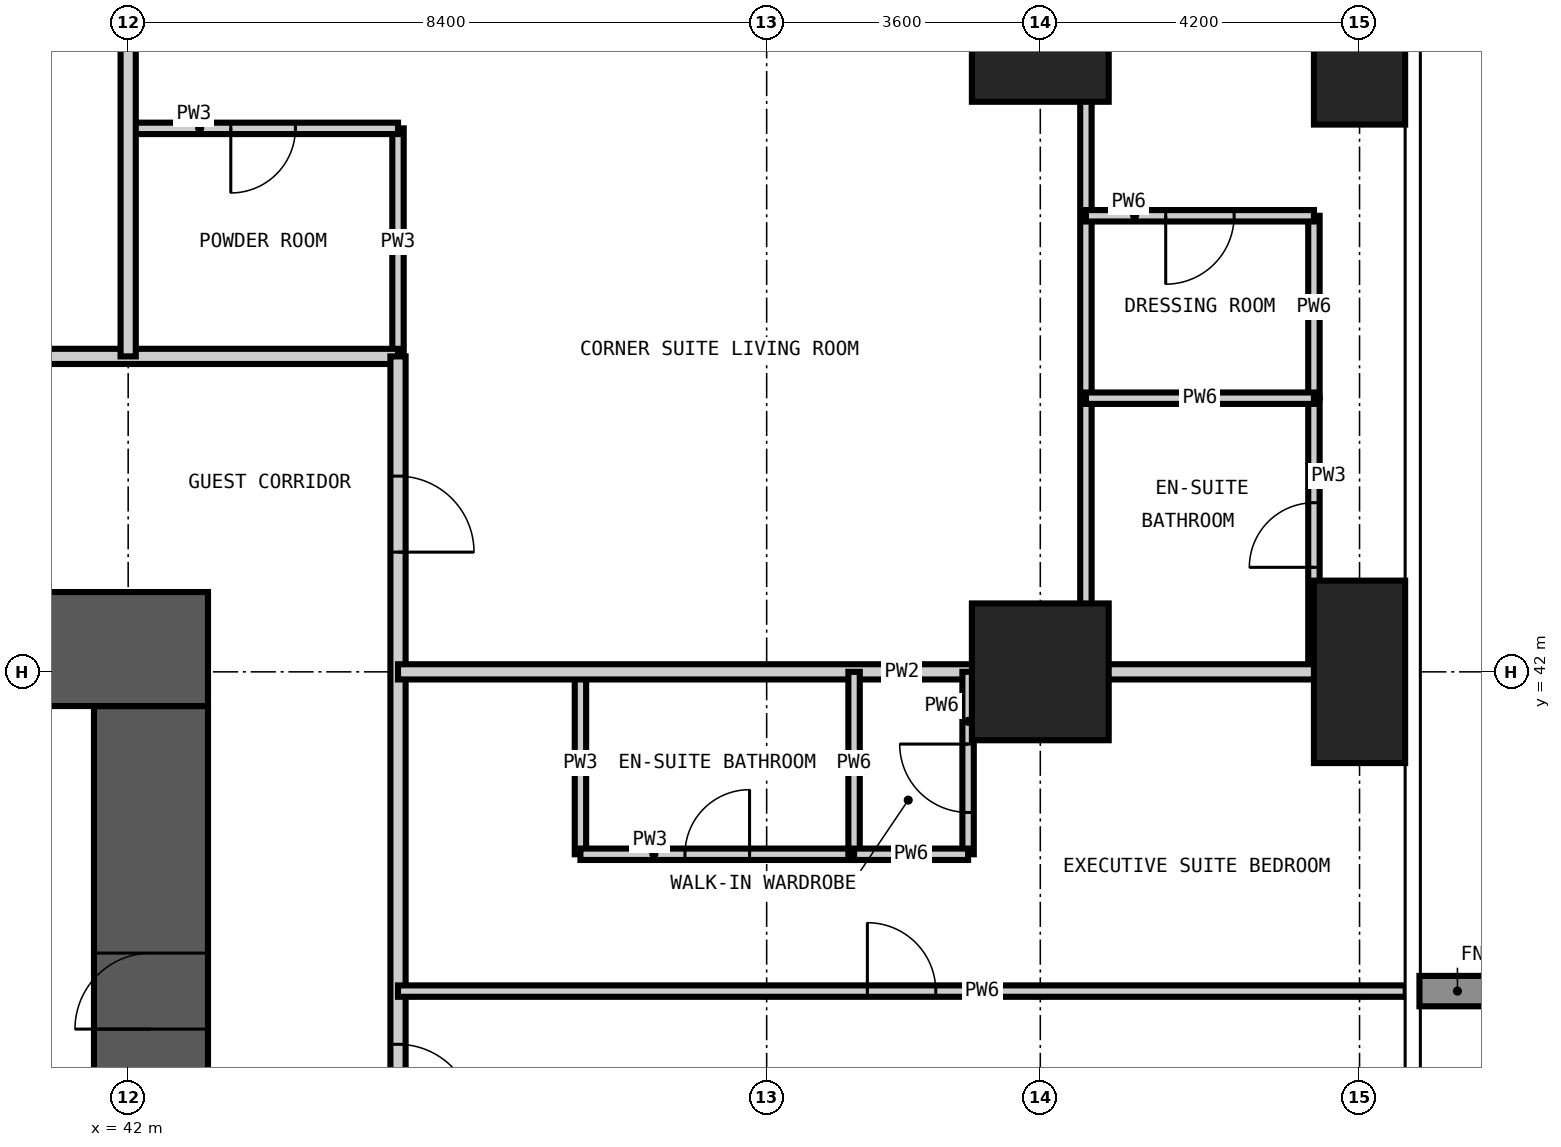
"""IFC4 building model, lengths in metres.
Left out: names, types, materials, properties, quantities, classifications, styles, units other than length and angle.
Written with IfcOpenShell. Run it as: python <this file> out.ifc"""

import sys

from ifc_helpers import new_model, si_unit, direction, frame, frame_2d, origin, origin_2d, place, context, subcontext, project, spatial, rectangle, extrude, element, fill, save


model = new_model("IFC4")
c1 = context("Model", 3, precision=1e-05, world=origin(), true_north=direction((0.0, 1.0)))
c2 = subcontext(c1, "Body", "Model", "MODEL_VIEW")
j1 = project(units=[si_unit("LENGTHUNIT", "METRE"), si_unit("PLANEANGLEUNIT", "RADIAN")], contexts=[c1])
p1 = place(None, origin())
s1 = spatial("IfcSite", under=j1, at=p1, CompositionType="ELEMENT")
p2 = place(p1, origin())
s2 = spatial("IfcBuilding", under=s1, at=p2, CompositionType="ELEMENT")
p3 = place(p2, frame((0.0, 0.0, 55.8)))
s3 = spatial("IfcBuildingStorey", under=s2, at=p3, CompositionType="ELEMENT", Elevation=55.8)
for number, where, z_axis, x_axis in (
    (1, (54.0, 42.0, -0.35), (0.0, 0.0, 1.0), (1.0, 0.0, 0.0)),
    (2, (54.0, 50.4, -0.35), (0.0, 0.0, 1.0), (1.0, 0.0, 0.0)),
):
    element("IfcColumn", number, at=place(p3, frame(where, z_axis=z_axis, x_axis=x_axis)), inside=s3, PredefinedType="COLUMN", context=c2, shape_type="SweptSolid", body=[
        extrude(rectangle(XDim=1.8, YDim=1.8, at=origin_2d()), origin(), (0.0, 0.0, 1.0), 3.6),
    ])
for number, where, z_axis, x_axis in (
    (3, (58.2, 42.0, -0.35), (0.0, 0.0, 1.0), (1.0, 0.0, 0.0)),
    (4, (58.2, 50.4, -0.35), (0.0, 0.0, 1.0), (1.0, 0.0, 0.0)),
):
    element("IfcColumn", number, at=place(p3, frame(where, z_axis=z_axis, x_axis=x_axis)), inside=s3, PredefinedType="COLUMN", context=c2, shape_type="SweptSolid", body=[
        extrude(rectangle(XDim=1.2, YDim=2.4, at=origin_2d()), origin(), (0.0, 0.0, 1.0), 3.6),
    ])
p4 = place(p3, frame((42.3, 17.25, -0.35), z_axis=(0.0, 0.0, 1.0), x_axis=(0.0, 1.0, 0.0)))
e5 = element("IfcWall", 5, at=p4, inside=s3, PredefinedType="SHEAR", context=c2, shape_type="SweptSolid", body=[
    extrude(rectangle(XDim=24.3, YDim=1.5, at=frame_2d((12.15, 0.0))), origin(), (0.0, 0.0, 1.0), 3.6),
])
p5 = place(p4, frame((0.35, 0.0, 0.35)))
e6 = element("IfcOpeningElement", 6, at=p5, cuts=e5, PredefinedType="OPENING", context=c2, shape_type="SweptSolid", body=[
    extrude(rectangle(XDim=1.2, YDim=2.2, at=frame_2d((0.6, 1.1))), frame((0.0, 0.76, 0.0), z_axis=(0.0, -1.0, 0.0), x_axis=(1.0, 0.0, 0.0)), (0.0, 0.0, 1.0), 1.52),
])
p6 = place(p4, frame((11.65, 0.0, 0.35)))
e7 = element("IfcOpeningElement", 7, at=p6, cuts=e5, PredefinedType="OPENING", context=c2, shape_type="SweptSolid", body=[
    extrude(rectangle(XDim=1.0, YDim=2.1, at=frame_2d((0.5, 1.05))), frame((0.0, 0.76, 0.0), z_axis=(0.0, -1.0, 0.0), x_axis=(1.0, 0.0, 0.0)), (0.0, 0.0, 1.0), 1.52),
])
p7 = place(p4, frame((20.05, 0.0, 0.35)))
e8 = element("IfcOpeningElement", 8, at=p7, cuts=e5, PredefinedType="OPENING", context=c2, shape_type="SweptSolid", body=[
    extrude(rectangle(XDim=1.0, YDim=2.1, at=frame_2d((0.5, 1.05))), frame((0.0, 0.76, 0.0), z_axis=(0.0, -1.0, 0.0), x_axis=(1.0, 0.0, 0.0)), (0.0, 0.0, 1.0), 1.52),
])
p8 = place(p3, frame((43.05, 42.3, -0.35), z_axis=(0.0, 0.0, 1.0), x_axis=(-1.0, 0.0, 0.0)))
e9 = element("IfcWall", 9, at=p8, inside=s3, PredefinedType="SHEAR", context=c2, shape_type="SweptSolid", body=[
    extrude(rectangle(XDim=27.3, YDim=1.5, at=frame_2d((13.65, 0.0))), origin(), (0.0, 0.0, 1.0), 3.6),
])
p9 = place(p8, frame((21.55, 0.0, 0.35)))
e10 = element("IfcOpeningElement", 10, at=p9, cuts=e9, PredefinedType="OPENING", context=c2, shape_type="SweptSolid", body=[
    extrude(rectangle(XDim=1.0, YDim=2.1, at=frame_2d((0.5, 1.05))), frame((0.0, 0.76, 0.0), z_axis=(0.0, -1.0, 0.0), x_axis=(1.0, 0.0, 0.0)), (0.0, 0.0, 1.0), 1.52),
])
p10 = place(p8, frame((10.95, 0.0, 0.35)))
e11 = element("IfcOpeningElement", 11, at=p10, cuts=e9, PredefinedType="OPENING", context=c2, shape_type="SweptSolid", body=[
    extrude(rectangle(XDim=1.2, YDim=2.2, at=frame_2d((0.6, 1.1))), frame((0.0, 0.76, 0.0), z_axis=(0.0, -1.0, 0.0), x_axis=(1.0, 0.0, 0.0)), (0.0, 0.0, 1.0), 1.52),
])
p11 = place(p3, frame((45.55, 46.15, 0.0), z_axis=(0.0, 0.0, 1.0), x_axis=(0.0, 1.0, 0.0)))
e12 = element("IfcWall", 12, at=p11, inside=s3, PredefinedType="PARTITIONING", context=c2, shape_type="SweptSolid", body=[
    extrude(rectangle(XDim=3.0, YDim=0.15, at=frame_2d((1.5, 0.0))), origin(), (0.0, 0.0, 1.0), 3.25),
])
p12 = place(p3, frame((47.95, 39.6, 0.0), z_axis=(0.0, 0.0, 1.0), x_axis=(0.0, 1.0, 0.0)))
e13 = element("IfcWall", 13, at=p12, inside=s3, PredefinedType="PARTITIONING", context=c2, shape_type="SweptSolid", body=[
    extrude(rectangle(XDim=2.4, YDim=0.15, at=frame_2d((1.2, 0.0))), origin(), (0.0, 0.0, 1.0), 3.25),
])
p13 = place(p3, frame((57.6, 42.0, 0.0), z_axis=(0.0, 0.0, 1.0), x_axis=(0.0, 1.0, 0.0)))
e14 = element("IfcWall", 14, at=p13, inside=s3, PredefinedType="PARTITIONING", context=c2, shape_type="SweptSolid", body=[
    extrude(rectangle(XDim=3.6, YDim=0.15, at=frame_2d((1.8, 0.0))), origin(), (0.0, 0.0, 1.0), 3.25),
])
p14 = place(p13, frame((1.375, 0.0, 0.0)))
e15 = element("IfcOpeningElement", 15, at=p14, cuts=e14, PredefinedType="OPENING", context=c2, shape_type="SweptSolid", body=[
    extrude(rectangle(XDim=0.85, YDim=2.1, at=frame_2d((0.425, 1.05))), frame((0.0, 0.085, 0.0), z_axis=(0.0, -1.0, 0.0), x_axis=(1.0, 0.0, 0.0)), (0.0, 0.0, 1.0), 0.17),
])
p15 = place(p3, frame((47.95, 39.6, 0.0), z_axis=(0.0, 0.0, 1.0), x_axis=(1.0, 0.0, 0.0)))
e16 = element("IfcWall", 16, at=p15, inside=s3, PredefinedType="PARTITIONING", context=c2, shape_type="SweptSolid", body=[
    extrude(rectangle(XDim=3.6, YDim=0.15, at=frame_2d((1.8, 0.0))), origin(), (0.0, 0.0, 1.0), 3.25),
])
p16 = place(p15, frame((1.375, 0.0, 0.0)))
e17 = element("IfcOpeningElement", 17, at=p16, cuts=e16, PredefinedType="OPENING", context=c2, shape_type="SweptSolid", body=[
    extrude(rectangle(XDim=0.85, YDim=2.1, at=frame_2d((0.425, 1.05))), frame((0.0, 0.085, 0.0), z_axis=(0.0, -1.0, 0.0), x_axis=(1.0, 0.0, 0.0)), (0.0, 0.0, 1.0), 0.17),
])
p17 = place(p3, frame((42.0, 49.15, 0.0), z_axis=(0.0, 0.0, 1.0), x_axis=(1.0, 0.0, 0.0)))
e18 = element("IfcWall", 18, at=p17, inside=s3, PredefinedType="PARTITIONING", context=c2, shape_type="SweptSolid", body=[
    extrude(rectangle(XDim=3.55, YDim=0.15, at=frame_2d((1.775, 0.0))), origin(), (0.0, 0.0, 1.0), 3.25),
])
p18 = place(p17, frame((1.35, 0.0, 0.0)))
e19 = element("IfcOpeningElement", 19, at=p18, cuts=e18, PredefinedType="OPENING", context=c2, shape_type="SweptSolid", body=[
    extrude(rectangle(XDim=0.85, YDim=2.1, at=frame_2d((0.425, 1.05))), frame((0.0, 0.085, 0.0), z_axis=(0.0, -1.0, 0.0), x_axis=(1.0, 0.0, 0.0)), (0.0, 0.0, 1.0), 0.17),
])
p19 = place(p3, frame((13.85, 46.15, 0.0), z_axis=(0.0, 0.0, 1.0), x_axis=(1.0, 0.0, 0.0)))
e20 = element("IfcWall", 20, at=p19, inside=s3, PredefinedType="PARTITIONING", context=c2, shape_type="SweptSolid", body=[
    extrude(rectangle(XDim=31.7, YDim=0.2, at=frame_2d((15.85, 0.0))), origin(), (0.0, 0.0, 1.0), 3.25),
])
p20 = place(p19, frame((6.65, 0.0, 0.0)))
e21 = element("IfcOpeningElement", 21, at=p20, cuts=e20, PredefinedType="OPENING", context=c2, shape_type="SweptSolid", body=[
    extrude(rectangle(XDim=1.0, YDim=2.2, at=frame_2d((0.5, 1.1))), frame((0.0, 0.11, 0.0), z_axis=(0.0, -1.0, 0.0), x_axis=(1.0, 0.0, 0.0)), (0.0, 0.0, 1.0), 0.22),
])
p21 = place(p19, frame((15.05, 0.0, 0.0)))
e22 = element("IfcOpeningElement", 22, at=p21, cuts=e20, PredefinedType="OPENING", context=c2, shape_type="SweptSolid", body=[
    extrude(rectangle(XDim=1.0, YDim=2.2, at=frame_2d((0.5, 1.1))), frame((0.0, 0.11, 0.0), z_axis=(0.0, -1.0, 0.0), x_axis=(1.0, 0.0, 0.0)), (0.0, 0.0, 1.0), 0.22),
])
p22 = place(p19, frame((23.45, 0.0, 0.0)))
e23 = element("IfcOpeningElement", 23, at=p22, cuts=e20, PredefinedType="OPENING", context=c2, shape_type="SweptSolid", body=[
    extrude(rectangle(XDim=1.0, YDim=2.2, at=frame_2d((0.5, 1.1))), frame((0.0, 0.11, 0.0), z_axis=(0.0, -1.0, 0.0), x_axis=(1.0, 0.0, 0.0)), (0.0, 0.0, 1.0), 0.22),
])
p23 = place(p3, frame((45.55, 46.15, 0.0), z_axis=(0.0, 0.0, 1.0), x_axis=(0.0, -1.0, 0.0)))
e24 = element("IfcWall", 24, at=p23, inside=s3, PredefinedType="PARTITIONING", context=c2, shape_type="SweptSolid", body=[
    extrude(rectangle(XDim=32.3, YDim=0.2, at=frame_2d((16.15, 0.0))), origin(), (0.0, 0.0, 1.0), 3.25),
])
p24 = place(p23, frame((25.85, 0.0, 0.0)))
e25 = element("IfcOpeningElement", 25, at=p24, cuts=e24, PredefinedType="OPENING", context=c2, shape_type="SweptSolid", body=[
    extrude(rectangle(XDim=1.0, YDim=2.2, at=frame_2d((0.5, 1.1))), frame((0.0, 0.11, 0.0), z_axis=(0.0, -1.0, 0.0), x_axis=(1.0, 0.0, 0.0)), (0.0, 0.0, 1.0), 0.22),
])
p25 = place(p23, frame((17.45, 0.0, 0.0)))
e26 = element("IfcOpeningElement", 26, at=p25, cuts=e24, PredefinedType="OPENING", context=c2, shape_type="SweptSolid", body=[
    extrude(rectangle(XDim=1.0, YDim=2.2, at=frame_2d((0.5, 1.1))), frame((0.0, 0.11, 0.0), z_axis=(0.0, -1.0, 0.0), x_axis=(1.0, 0.0, 0.0)), (0.0, 0.0, 1.0), 0.22),
])
p26 = place(p23, frame((9.05, 0.0, 0.0)))
e27 = element("IfcOpeningElement", 27, at=p26, cuts=e24, PredefinedType="OPENING", context=c2, shape_type="SweptSolid", body=[
    extrude(rectangle(XDim=1.0, YDim=2.2, at=frame_2d((0.5, 1.1))), frame((0.0, 0.11, 0.0), z_axis=(0.0, -1.0, 0.0), x_axis=(1.0, 0.0, 0.0)), (0.0, 0.0, 1.0), 0.22),
])
p27 = place(p23, frame((30.325, 0.0, 0.0)))
e28 = element("IfcOpeningElement", 28, at=p27, cuts=e24, PredefinedType="OPENING", context=c2, shape_type="SweptSolid", body=[
    extrude(rectangle(XDim=1.0, YDim=2.2, at=frame_2d((0.5, 1.1))), frame((0.0, 0.11, 0.0), z_axis=(0.0, -1.0, 0.0), x_axis=(1.0, 0.0, 0.0)), (0.0, 0.0, 1.0), 0.22),
])
p28 = place(p23, frame((1.575, 0.0, 0.0)))
e29 = element("IfcOpeningElement", 29, at=p28, cuts=e24, PredefinedType="OPENING", context=c2, shape_type="SweptSolid", body=[
    extrude(rectangle(XDim=1.0, YDim=2.2, at=frame_2d((0.5, 1.1))), frame((0.0, 0.11, 0.0), z_axis=(0.0, -1.0, 0.0), x_axis=(1.0, 0.0, 0.0)), (0.0, 0.0, 1.0), 0.22),
])
p29 = place(p3, frame((42.0, 46.15, 0.0), z_axis=(0.0, 0.0, 1.0), x_axis=(0.0, 1.0, 0.0)))
e30 = element("IfcWall", 30, at=p29, inside=s3, PredefinedType="PARTITIONING", context=c2, shape_type="SweptSolid", body=[
    extrude(rectangle(XDim=12.658, YDim=0.2, at=frame_2d((6.329, 0.0))), origin(), (0.0, 0.0, 1.0), 3.25),
])
p30 = place(p3, frame((45.55, 42.0, 0.0), z_axis=(0.0, 0.0, 1.0), x_axis=(1.0, 0.0, 0.0)))
e31 = element("IfcWall", 31, at=p30, inside=s3, PredefinedType="PARTITIONING", context=c2, shape_type="SweptSolid", body=[
    extrude(rectangle(XDim=13.258, YDim=0.2, at=frame_2d((6.629, 0.0))), origin(), (0.0, 0.0, 1.0), 3.25),
])
p31 = place(p3, frame((51.55, 39.6, 0.0), z_axis=(0.0, 0.0, 1.0), x_axis=(0.0, 1.0, 0.0)))
e32 = element("IfcWall", 32, at=p31, inside=s3, PredefinedType="PARTITIONING", context=c2, shape_type="SweptSolid", body=[
    extrude(rectangle(XDim=2.4, YDim=0.15, at=frame_2d((1.2, 0.0))), origin(), (0.0, 0.0, 1.0), 3.25),
])
p32 = place(p3, frame((53.05, 39.6, 0.0), z_axis=(0.0, 0.0, 1.0), x_axis=(0.0, 1.0, 0.0)))
e33 = element("IfcWall", 33, at=p32, inside=s3, PredefinedType="PARTITIONING", context=c2, shape_type="SweptSolid", body=[
    extrude(rectangle(XDim=2.4, YDim=0.15, at=frame_2d((1.2, 0.0))), origin(), (0.0, 0.0, 1.0), 3.25),
])
p33 = place(p32, frame((0.55, 0.0, 0.0)))
e34 = element("IfcOpeningElement", 34, at=p33, cuts=e33, PredefinedType="OPENING", context=c2, shape_type="SweptSolid", body=[
    extrude(rectangle(XDim=0.9, YDim=2.1, at=frame_2d((0.45, 1.05))), frame((0.0, 0.085, 0.0), z_axis=(0.0, -1.0, 0.0), x_axis=(1.0, 0.0, 0.0)), (0.0, 0.0, 1.0), 0.17),
])
p34 = place(p3, frame((54.6, 42.0, 0.0), z_axis=(0.0, 0.0, 1.0), x_axis=(0.0, 1.0, 0.0)))
e35 = element("IfcWall", 35, at=p34, inside=s3, PredefinedType="PARTITIONING", context=c2, shape_type="SweptSolid", body=[
    extrude(rectangle(XDim=16.808, YDim=0.15, at=frame_2d((8.404, 0.0))), origin(), (0.0, 0.0, 1.0), 3.25),
])
p35 = place(p34, frame((10.95, 0.0, 0.0)))
e36 = element("IfcOpeningElement", 36, at=p35, cuts=e35, PredefinedType="OPENING", context=c2, shape_type="SweptSolid", body=[
    extrude(rectangle(XDim=0.9, YDim=2.1, at=frame_2d((0.45, 1.05))), frame((0.0, 0.085, 0.0), z_axis=(0.0, -1.0, 0.0), x_axis=(1.0, 0.0, 0.0)), (0.0, 0.0, 1.0), 0.17),
])
p36 = place(p3, frame((57.6, 45.6, 0.0), z_axis=(0.0, 0.0, 1.0), x_axis=(0.0, 1.0, 0.0)))
e37 = element("IfcWall", 37, at=p36, inside=s3, PredefinedType="PARTITIONING", context=c2, shape_type="SweptSolid", body=[
    extrude(rectangle(XDim=2.4, YDim=0.15, at=frame_2d((1.2, 0.0))), origin(), (0.0, 0.0, 1.0), 3.25),
])
p37 = place(p3, frame((45.55, 37.8, 0.0), z_axis=(0.0, 0.0, 1.0), x_axis=(1.0, 0.0, 0.0)))
e38 = element("IfcWall", 38, at=p37, inside=s3, PredefinedType="PARTITIONING", context=c2, shape_type="SweptSolid", body=[
    extrude(rectangle(XDim=13.258, YDim=0.15, at=frame_2d((6.629, 0.0))), origin(), (0.0, 0.0, 1.0), 3.25),
])
p38 = place(p37, frame((6.175, 0.0, 0.0)))
e39 = element("IfcOpeningElement", 39, at=p38, cuts=e38, PredefinedType="OPENING", context=c2, shape_type="SweptSolid", body=[
    extrude(rectangle(XDim=0.9, YDim=2.1, at=frame_2d((0.45, 1.05))), frame((0.0, 0.085, 0.0), z_axis=(0.0, -1.0, 0.0), x_axis=(1.0, 0.0, 0.0)), (0.0, 0.0, 1.0), 0.17),
])
p39 = place(p3, frame((51.55, 39.6, 0.0), z_axis=(0.0, 0.0, 1.0), x_axis=(1.0, 0.0, 0.0)))
e40 = element("IfcWall", 40, at=p39, inside=s3, PredefinedType="PARTITIONING", context=c2, shape_type="SweptSolid", body=[
    extrude(rectangle(XDim=1.5, YDim=0.15, at=frame_2d((0.75, 0.0))), origin(), (0.0, 0.0, 1.0), 3.25),
])
p40 = place(p3, frame((54.6, 45.6, 0.0), z_axis=(0.0, 0.0, 1.0), x_axis=(1.0, 0.0, 0.0)))
e41 = element("IfcWall", 41, at=p40, inside=s3, PredefinedType="PARTITIONING", context=c2, shape_type="SweptSolid", body=[
    extrude(rectangle(XDim=3.0, YDim=0.15, at=frame_2d((1.5, 0.0))), origin(), (0.0, 0.0, 1.0), 3.25),
])
p41 = place(p3, frame((54.6, 48.0, 0.0), z_axis=(0.0, 0.0, 1.0), x_axis=(1.0, 0.0, 0.0)))
e42 = element("IfcWall", 42, at=p41, inside=s3, PredefinedType="PARTITIONING", context=c2, shape_type="SweptSolid", body=[
    extrude(rectangle(XDim=3.0, YDim=0.15, at=frame_2d((1.5, 0.0))), origin(), (0.0, 0.0, 1.0), 3.25),
])
p42 = place(p41, frame((1.05, 0.0, 0.0)))
e43 = element("IfcOpeningElement", 43, at=p42, cuts=e42, PredefinedType="OPENING", context=c2, shape_type="SweptSolid", body=[
    extrude(rectangle(XDim=0.9, YDim=2.1, at=frame_2d((0.45, 1.05))), frame((0.0, 0.085, 0.0), z_axis=(0.0, -1.0, 0.0), x_axis=(1.0, 0.0, 0.0)), (0.0, 0.0, 1.0), 0.17),
])
p43 = place(p26, origin())
e44 = element("IfcDoor", 44, at=p43, inside=s3, OperationType="SINGLE_SWING_RIGHT", PredefinedType="DOOR", context=c2, shape_type="SweptSolid", body=[
    extrude(rectangle(XDim=1.0, YDim=2.2, at=frame_2d((0.5, 1.1))), frame((0.0, 0.025, 0.0), z_axis=(0.0, -1.0, 0.0), x_axis=(1.0, 0.0, 0.0)), (0.0, 0.0, 1.0), 0.05),
])
fill(e27, e44)
p44 = place(p38, origin())
e45 = element("IfcDoor", 45, at=p44, inside=s3, OperationType="SINGLE_SWING_LEFT", PredefinedType="DOOR", context=c2, shape_type="SweptSolid", body=[
    extrude(rectangle(XDim=0.9, YDim=2.1, at=frame_2d((0.45, 1.05))), frame((0.0, 0.025, 0.0), z_axis=(0.0, -1.0, 0.0), x_axis=(1.0, 0.0, 0.0)), (0.0, 0.0, 1.0), 0.05),
])
fill(e39, e45)
p45 = place(p16, origin())
e46 = element("IfcDoor", 46, at=p45, inside=s3, OperationType="SINGLE_SWING_RIGHT", PredefinedType="DOOR", context=c2, shape_type="SweptSolid", body=[
    extrude(rectangle(XDim=0.85, YDim=2.1, at=frame_2d((0.425, 1.05))), frame((0.0, 0.025, 0.0), z_axis=(0.0, -1.0, 0.0), x_axis=(1.0, 0.0, 0.0)), (0.0, 0.0, 1.0), 0.05),
])
fill(e17, e46)
p46 = place(p33, origin())
e47 = element("IfcDoor", 47, at=p46, inside=s3, OperationType="SINGLE_SWING_RIGHT", PredefinedType="DOOR", context=c2, shape_type="SweptSolid", body=[
    extrude(rectangle(XDim=0.9, YDim=2.1, at=frame_2d((0.45, 1.05))), frame((0.0, 0.025, 0.0), z_axis=(0.0, -1.0, 0.0), x_axis=(1.0, 0.0, 0.0)), (0.0, 0.0, 1.0), 0.05),
])
fill(e34, e47)
p47 = place(p28, origin())
e48 = element("IfcDoor", 48, at=p47, inside=s3, OperationType="SINGLE_SWING_RIGHT", PredefinedType="DOOR", context=c2, shape_type="SweptSolid", body=[
    extrude(rectangle(XDim=1.0, YDim=2.2, at=frame_2d((0.5, 1.1))), frame((0.0, 0.025, 0.0), z_axis=(0.0, -1.0, 0.0), x_axis=(1.0, 0.0, 0.0)), (0.0, 0.0, 1.0), 0.05),
])
fill(e29, e48)
p48 = place(p18, frame((0.85, 0.0, 0.0), z_axis=(0.0, 0.0, 1.0), x_axis=(-1.0, 0.0, 0.0)))
e49 = element("IfcDoor", 49, at=p48, inside=s3, OperationType="SINGLE_SWING_RIGHT", PredefinedType="DOOR", context=c2, shape_type="SweptSolid", body=[
    extrude(rectangle(XDim=0.85, YDim=2.1, at=frame_2d((0.425, 1.05))), frame((0.0, 0.025, 0.0), z_axis=(0.0, -1.0, 0.0), x_axis=(1.0, 0.0, 0.0)), (0.0, 0.0, 1.0), 0.05),
])
fill(e19, e49)
p49 = place(p14, origin())
e50 = element("IfcDoor", 50, at=p49, inside=s3, OperationType="SINGLE_SWING_LEFT", PredefinedType="DOOR", context=c2, shape_type="SweptSolid", body=[
    extrude(rectangle(XDim=0.85, YDim=2.1, at=frame_2d((0.425, 1.05))), frame((0.0, 0.025, 0.0), z_axis=(0.0, -1.0, 0.0), x_axis=(1.0, 0.0, 0.0)), (0.0, 0.0, 1.0), 0.05),
])
fill(e15, e50)
p50 = place(p42, frame((0.9, 0.0, 0.0), z_axis=(0.0, 0.0, 1.0), x_axis=(-1.0, 0.0, 0.0)))
e51 = element("IfcDoor", 51, at=p50, inside=s3, OperationType="SINGLE_SWING_RIGHT", PredefinedType="DOOR", context=c2, shape_type="SweptSolid", body=[
    extrude(rectangle(XDim=0.9, YDim=2.1, at=frame_2d((0.45, 1.05))), frame((0.0, 0.025, 0.0), z_axis=(0.0, -1.0, 0.0), x_axis=(1.0, 0.0, 0.0)), (0.0, 0.0, 1.0), 0.05),
])
fill(e43, e51)
p51 = place(p7, origin())
e52 = element("IfcDoor", 52, at=p51, inside=s3, OperationType="SINGLE_SWING_LEFT", PredefinedType="DOOR", context=c2, shape_type="SweptSolid", body=[
    extrude(rectangle(XDim=1.0, YDim=2.1, at=frame_2d((0.5, 1.05))), frame((0.0, 0.025, 0.0), z_axis=(0.0, -1.0, 0.0), x_axis=(1.0, 0.0, 0.0)), (0.0, 0.0, 1.0), 0.05),
])
fill(e8, e52)
save(model, sys.argv[1])
